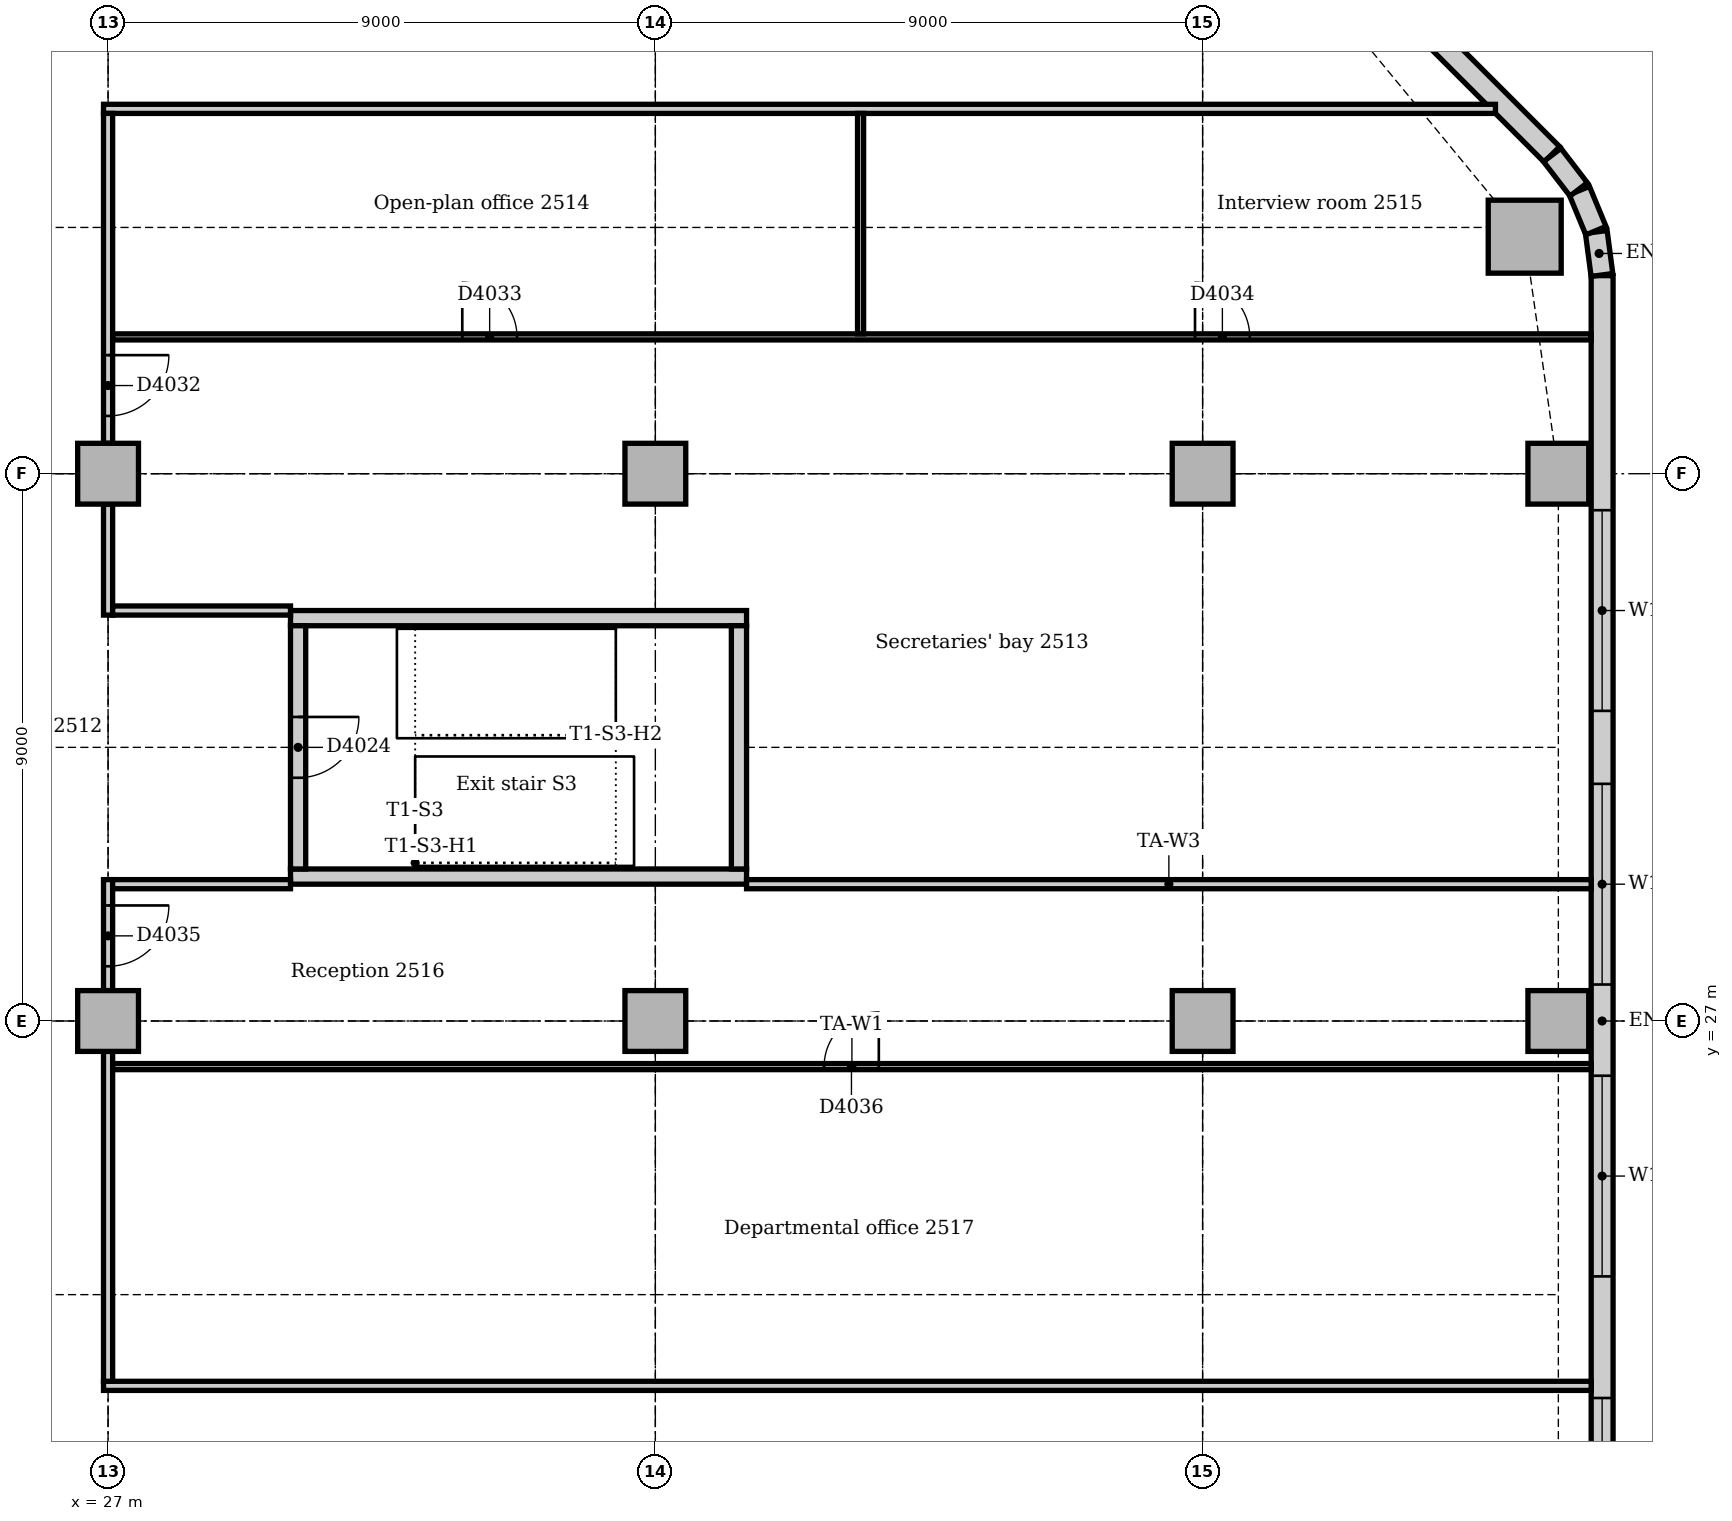
"""IFC4 building model, lengths in metres.
Left out: names, types, materials, properties, quantities, classifications, styles, units other than length and angle.
Written with IfcOpenShell. Run it as: python <this file> out.ifc"""

import sys

from ifc_helpers import new_model, si_unit, direction, frame, frame_2d, origin, origin_2d, place, context, subcontext, project, spatial, rectangle, extrude, element, fill, save


model = new_model("IFC4")
c1 = context("Model", 3, precision=1e-05, world=origin(), true_north=direction((0.0, 1.0)))
c2 = subcontext(c1, "Body", "Model", "MODEL_VIEW")
j1 = project(units=[si_unit("LENGTHUNIT", "METRE"), si_unit("PLANEANGLEUNIT", "RADIAN")], contexts=[c1])
p1 = place(None, origin())
s1 = spatial("IfcSite", under=j1, at=p1, CompositionType="ELEMENT")
p2 = place(p1, origin())
s2 = spatial("IfcBuilding", under=s1, at=p2, CompositionType="ELEMENT")
p3 = place(p2, frame((0.0, 0.0, 108.0)))
s3 = spatial("IfcBuildingStorey", under=s2, at=p3, CompositionType="ELEMENT", Elevation=108.0)
for number, where, z_axis, x_axis in (
    (1, (30.0, 29.375, 0.0), (0.0, 0.0, 1.0), (1.0, 0.0, 0.0)),
    (2, (37.5, 33.625, 0.0), (0.0, 0.0, 1.0), (-1.0, 0.0, 0.0)),
):
    element("IfcWall", number, at=place(p3, frame(where, z_axis=z_axis, x_axis=x_axis)), inside=s3, PredefinedType="SOLIDWALL", context=c2, shape_type="SweptSolid", body=[
        extrude(rectangle(XDim=7.5, YDim=0.25, at=frame_2d((3.75, 0.0))), origin(), (0.0, 0.0, 1.0), 4.0),
    ])
p4 = place(p3, frame((37.375, 29.5, 0.0), z_axis=(0.0, 0.0, 1.0), x_axis=(0.0, 1.0, 0.0)))
e3 = element("IfcWall", 3, at=p4, inside=s3, PredefinedType="SOLIDWALL", context=c2, shape_type="SweptSolid", body=[
    extrude(rectangle(XDim=4.0, YDim=0.25, at=frame_2d((2.0, 0.0))), origin(), (0.0, 0.0, 1.0), 4.0),
])
p5 = place(p3, frame((30.125, 33.5, 0.0), z_axis=(0.0, 0.0, 1.0), x_axis=(0.0, -1.0, 0.0)))
e4 = element("IfcWall", 4, at=p5, inside=s3, PredefinedType="SOLIDWALL", context=c2, shape_type="SweptSolid", body=[
    extrude(rectangle(XDim=4.0, YDim=0.25, at=frame_2d((2.0, 0.0))), origin(), (0.0, 0.0, 1.0), 4.0),
])
p6 = place(p5, frame((1.5, 0.0, 0.0)))
e5 = element("IfcOpeningElement", 5, at=p6, cuts=e4, PredefinedType="OPENING", context=c2, shape_type="SweptSolid", body=[
    extrude(rectangle(XDim=1.0, YDim=2.1, at=frame_2d((0.5, 1.05))), frame((0.0, 0.135, 0.0), z_axis=(0.0, -1.0, 0.0), x_axis=(1.0, 0.0, 0.0)), (0.0, 0.0, 1.0), 0.27),
])
p7 = place(p3, frame((50.297, 39.898, 0.0), z_axis=(0.0, 0.0, 1.0), x_axis=(1.0, 0.0, 0.0)))
e6 = element("IfcColumn", 6, at=p7, inside=s3, PredefinedType="COLUMN", context=c2, shape_type="SweptSolid", body=[
    extrude(rectangle(XDim=1.2, YDim=1.2, at=origin_2d()), origin(), (0.0, 0.0, 1.0), 3.85),
])
for number, where, z_axis, x_axis in (
    (7, (50.85, 27.0, 0.0), (0.0, 0.0, 1.0), (1.0, 0.0, 0.0)),
    (8, (50.85, 36.0, 0.0), (0.0, 0.0, 1.0), (1.0, 0.0, 0.0)),
    (9, (27.0, 27.0, 0.0), (0.0, 0.0, 1.0), (1.0, 0.0, 0.0)),
    (10, (27.0, 36.0, 0.0), (0.0, 0.0, 1.0), (1.0, 0.0, 0.0)),
    (11, (36.0, 27.0, 0.0), (0.0, 0.0, 1.0), (1.0, 0.0, 0.0)),
    (12, (36.0, 36.0, 0.0), (0.0, 0.0, 1.0), (1.0, 0.0, 0.0)),
    (13, (45.0, 27.0, 0.0), (0.0, 0.0, 1.0), (1.0, 0.0, 0.0)),
    (14, (45.0, 36.0, 0.0), (0.0, 0.0, 1.0), (1.0, 0.0, 0.0)),
):
    element("IfcColumn", number, at=place(p3, frame(where, z_axis=z_axis, x_axis=x_axis)), inside=s3, PredefinedType="COLUMN", context=c2, shape_type="SweptSolid", body=[
        extrude(rectangle(XDim=1.0, YDim=1.0, at=origin_2d()), origin(), (0.0, 0.0, 1.0), 3.85),
    ])
p8 = place(p3, frame((51.57, 14.743, 0.0), z_axis=(0.0, 0.0, 1.0), x_axis=(0.0, 1.0, 0.0)))
e15 = element("IfcWall", 15, at=p8, inside=s3, PredefinedType="STANDARD", context=c2, shape_type="SweptSolid", body=[
    extrude(rectangle(XDim=24.515, YDim=0.36, at=frame_2d((12.257, 0.0))), origin(), (0.0, 0.0, 1.0), 3.85),
])
p9 = place(p8, frame((4.257, 0.0, 0.9)))
e16 = element("IfcOpeningElement", 16, at=p9, cuts=e15, PredefinedType="OPENING", context=c2, shape_type="SweptSolid", body=[
    extrude(rectangle(XDim=1.8, YDim=1.6, at=frame_2d((0.9, 0.8))), frame((0.0, 0.19, 0.0), z_axis=(0.0, -1.0, 0.0), x_axis=(1.0, 0.0, 0.0)), (0.0, 0.0, 1.0), 0.38),
])
p10 = place(p8, frame((8.057, 0.0, 0.9)))
e17 = element("IfcOpeningElement", 17, at=p10, cuts=e15, PredefinedType="OPENING", context=c2, shape_type="SweptSolid", body=[
    extrude(rectangle(XDim=3.3, YDim=1.6, at=frame_2d((1.65, 0.8))), frame((0.0, 0.19, 0.0), z_axis=(0.0, -1.0, 0.0), x_axis=(1.0, 0.0, 0.0)), (0.0, 0.0, 1.0), 0.38),
])
p11 = place(p8, frame((12.857, 0.0, 0.9)))
e18 = element("IfcOpeningElement", 18, at=p11, cuts=e15, PredefinedType="OPENING", context=c2, shape_type="SweptSolid", body=[
    extrude(rectangle(XDim=3.3, YDim=1.6, at=frame_2d((1.65, 0.8))), frame((0.0, 0.19, 0.0), z_axis=(0.0, -1.0, 0.0), x_axis=(1.0, 0.0, 0.0)), (0.0, 0.0, 1.0), 0.38),
])
p12 = place(p8, frame((17.357, 0.0, 0.9)))
e19 = element("IfcOpeningElement", 19, at=p12, cuts=e15, PredefinedType="OPENING", context=c2, shape_type="SweptSolid", body=[
    extrude(rectangle(XDim=3.3, YDim=1.6, at=frame_2d((1.65, 0.8))), frame((0.0, 0.19, 0.0), z_axis=(0.0, -1.0, 0.0), x_axis=(1.0, 0.0, 0.0)), (0.0, 0.0, 1.0), 0.38),
])
p13 = place(p3, frame((50.744, 41.251, 0.0), z_axis=(0.0, 0.0, 1.0), x_axis=(-0.707106781187, 0.707106781187, 0.0)))
e20 = element("IfcWall", 20, at=p13, inside=s3, PredefinedType="STANDARD", context=c2, shape_type="SweptSolid", body=[
    extrude(rectangle(XDim=10.243, YDim=0.36, at=frame_2d((5.121, 0.0))), origin(), (0.0, 0.0, 1.0), 3.85),
])
p14 = place(p13, frame((3.471, 0.0, 0.9)))
e21 = element("IfcOpeningElement", 21, at=p14, cuts=e20, PredefinedType="OPENING", context=c2, shape_type="SweptSolid", body=[
    extrude(rectangle(XDim=3.3, YDim=1.6, at=frame_2d((1.65, 0.8))), frame((0.0, 0.19, 0.0), z_axis=(0.0, -1.0, 0.0), x_axis=(1.0, 0.0, 0.0)), (0.0, 0.0, 1.0), 0.38),
])
for number, where, z_axis, x_axis in (
    (22, (51.567, 39.269, 0.0), (0.0, 0.0, 1.0), (-0.131, 0.991, 0.0)),
    (23, (51.468, 39.997, 0.0), (0.0, 0.0, 1.0), (-0.383, 0.924, 0.0)),
):
    element("IfcWall", number, at=place(p3, frame(where, z_axis=z_axis, x_axis=x_axis)), inside=s3, PredefinedType="STANDARD", context=c2, shape_type="SweptSolid", body=[
        extrude(rectangle(XDim=0.713, YDim=0.36, at=frame_2d((0.356, 0.0))), origin(), (0.0, 0.0, 1.0), 3.85),
    ])
p15 = place(p3, frame((51.184, 40.675, 0.0), z_axis=(0.0, 0.0, 1.0), x_axis=(-0.608802368033, 0.793321924995, 0.0)))
e24 = element("IfcWall", 24, at=p15, inside=s3, PredefinedType="STANDARD", context=c2, shape_type="SweptSolid", body=[
    extrude(rectangle(XDim=0.713, YDim=0.36, at=frame_2d((0.357, 0.0))), origin(), (0.0, 0.0, 1.0), 3.85),
])
p16 = place(p3, frame((26.925, 21.0, 0.0), z_axis=(0.0, 0.0, 1.0), x_axis=(1.0, 0.0, 0.0)))
e25 = element("IfcWall", 25, at=p16, inside=s3, PredefinedType="PARTITIONING", context=c2, shape_type="SweptSolid", body=[
    extrude(rectangle(XDim=24.465, YDim=0.15, at=frame_2d((12.232, 0.0))), origin(), (0.0, 0.0, 1.0), 3.85),
])
p17 = place(p3, frame((26.925, 42.0, 0.0), z_axis=(0.0, 0.0, 1.0), x_axis=(1.0, 0.0, 0.0)))
e26 = element("IfcWall", 26, at=p17, inside=s3, PredefinedType="PARTITIONING", context=c2, shape_type="SweptSolid", body=[
    extrude(rectangle(XDim=22.891, YDim=0.15, at=frame_2d((11.445, 0.0))), origin(), (0.0, 0.0, 1.0), 3.85),
])
p18 = place(p3, frame((27.0, 21.075, 0.0), z_axis=(0.0, 0.0, 1.0), x_axis=(0.0, 1.0, 0.0)))
e27 = element("IfcWall", 27, at=p18, inside=s3, PredefinedType="PARTITIONING", context=c2, shape_type="SweptSolid", body=[
    extrude(rectangle(XDim=5.425, YDim=0.15, at=frame_2d((2.712, 0.0))), origin(), (0.0, 0.0, 1.0), 3.256),
])
p19 = place(p3, frame((27.0, 27.5, 0.0), z_axis=(0.0, 0.0, 1.0), x_axis=(0.0, 1.0, 0.0)))
e28 = element("IfcWall", 28, at=p19, inside=s3, PredefinedType="PARTITIONING", context=c2, shape_type="SweptSolid", body=[
    extrude(rectangle(XDim=1.825, YDim=0.15, at=frame_2d((0.912, 0.0))), origin(), (0.0, 0.0, 1.0), 3.256),
])
p20 = place(p19, frame((0.4, 0.0, 0.0)))
e29 = element("IfcOpeningElement", 29, at=p20, cuts=e28, PredefinedType="OPENING", context=c2, shape_type="SweptSolid", body=[
    extrude(rectangle(XDim=1.0, YDim=2.1, at=frame_2d((0.5, 1.05))), frame((0.0, 0.085, 0.0), z_axis=(0.0, -1.0, 0.0), x_axis=(1.0, 0.0, 0.0)), (0.0, 0.0, 1.0), 0.17),
])
p21 = place(p3, frame((27.0, 33.675, 0.0), z_axis=(0.0, 0.0, 1.0), x_axis=(0.0, 1.0, 0.0)))
e30 = element("IfcWall", 30, at=p21, inside=s3, PredefinedType="PARTITIONING", context=c2, shape_type="SweptSolid", body=[
    extrude(rectangle(XDim=1.825, YDim=0.15, at=frame_2d((0.912, 0.0))), origin(), (0.0, 0.0, 1.0), 3.256),
])
p22 = place(p3, frame((27.0, 36.5, 0.0), z_axis=(0.0, 0.0, 1.0), x_axis=(0.0, 1.0, 0.0)))
e31 = element("IfcWall", 31, at=p22, inside=s3, PredefinedType="PARTITIONING", context=c2, shape_type="SweptSolid", body=[
    extrude(rectangle(XDim=5.425, YDim=0.15, at=frame_2d((2.712, 0.0))), origin(), (0.0, 0.0, 1.0), 3.256),
])
p23 = place(p22, frame((0.45, 0.0, 0.0)))
e32 = element("IfcOpeningElement", 32, at=p23, cuts=e31, PredefinedType="OPENING", context=c2, shape_type="SweptSolid", body=[
    extrude(rectangle(XDim=1.0, YDim=2.1, at=frame_2d((0.5, 1.05))), frame((0.0, 0.085, 0.0), z_axis=(0.0, -1.0, 0.0), x_axis=(1.0, 0.0, 0.0)), (0.0, 0.0, 1.0), 0.17),
])
for number, where, z_axis, x_axis in (
    (33, (27.075, 29.25, 0.0), (0.0, 0.0, 1.0), (1.0, 0.0, 0.0)),
    (34, (27.075, 33.75, 0.0), (0.0, 0.0, 1.0), (1.0, 0.0, 0.0)),
):
    element("IfcWall", number, at=place(p3, frame(where, z_axis=z_axis, x_axis=x_axis)), inside=s3, PredefinedType="PARTITIONING", context=c2, shape_type="SweptSolid", body=[
        extrude(rectangle(XDim=2.925, YDim=0.15, at=frame_2d((1.462, 0.0))), origin(), (0.0, 0.0, 1.0), 3.85),
    ])
p24 = place(p3, frame((37.5, 29.25, 0.0), z_axis=(0.0, 0.0, 1.0), x_axis=(1.0, 0.0, 0.0)))
e35 = element("IfcWall", 35, at=p24, inside=s3, PredefinedType="PARTITIONING", context=c2, shape_type="SweptSolid", body=[
    extrude(rectangle(XDim=13.89, YDim=0.15, at=frame_2d((6.945, 0.0))), origin(), (0.0, 0.0, 1.0), 3.85),
])
p25 = place(p3, frame((27.075, 26.25, 0.0), z_axis=(0.0, 0.0, 1.0), x_axis=(1.0, 0.0, 0.0)))
e36 = element("IfcWall", 36, at=p25, inside=s3, PredefinedType="PARTITIONING", context=c2, shape_type="SweptSolid", body=[
    extrude(rectangle(XDim=24.315, YDim=0.1, at=frame_2d((12.158, 0.0))), origin(), (0.0, 0.0, 1.0), 3.85),
])
p26 = place(p25, frame((11.7, 0.0, 0.0)))
e37 = element("IfcOpeningElement", 37, at=p26, cuts=e36, PredefinedType="OPENING", context=c2, shape_type="SweptSolid", body=[
    extrude(rectangle(XDim=0.9, YDim=2.1, at=frame_2d((0.45, 1.05))), frame((0.0, 0.06, 0.0), z_axis=(0.0, -1.0, 0.0), x_axis=(1.0, 0.0, 0.0)), (0.0, 0.0, 1.0), 0.12),
])
p27 = place(p3, frame((27.075, 38.25, 0.0), z_axis=(0.0, 0.0, 1.0), x_axis=(1.0, 0.0, 0.0)))
e38 = element("IfcWall", 38, at=p27, inside=s3, PredefinedType="PARTITIONING", context=c2, shape_type="SweptSolid", body=[
    extrude(rectangle(XDim=24.315, YDim=0.1, at=frame_2d((12.158, 0.0))), origin(), (0.0, 0.0, 1.0), 3.85),
])
p28 = place(p27, frame((5.75, 0.0, 0.0)))
e39 = element("IfcOpeningElement", 39, at=p28, cuts=e38, PredefinedType="OPENING", context=c2, shape_type="SweptSolid", body=[
    extrude(rectangle(XDim=0.9, YDim=2.1, at=frame_2d((0.45, 1.05))), frame((0.0, 0.06, 0.0), z_axis=(0.0, -1.0, 0.0), x_axis=(1.0, 0.0, 0.0)), (0.0, 0.0, 1.0), 0.12),
])
p29 = place(p27, frame((17.8, 0.0, 0.0)))
e40 = element("IfcOpeningElement", 40, at=p29, cuts=e38, PredefinedType="OPENING", context=c2, shape_type="SweptSolid", body=[
    extrude(rectangle(XDim=0.9, YDim=2.1, at=frame_2d((0.45, 1.05))), frame((0.0, 0.06, 0.0), z_axis=(0.0, -1.0, 0.0), x_axis=(1.0, 0.0, 0.0)), (0.0, 0.0, 1.0), 0.12),
])
p30 = place(p3, frame((39.375, 38.3, 0.0), z_axis=(0.0, 0.0, 1.0), x_axis=(0.0, 1.0, 0.0)))
e41 = element("IfcWall", 41, at=p30, inside=s3, PredefinedType="PARTITIONING", context=c2, shape_type="SweptSolid", body=[
    extrude(rectangle(XDim=3.625, YDim=0.1, at=frame_2d((1.812, 0.0))), origin(), (0.0, 0.0, 1.0), 3.85),
])
p31 = place(p9, origin())
e42 = element("IfcWindow", 42, at=p31, inside=s3, PartitioningType="SINGLE_PANEL", PredefinedType="WINDOW", context=c2, shape_type="SweptSolid", body=[
    extrude(rectangle(XDim=1.8, YDim=1.6, at=frame_2d((0.9, 0.8))), frame((0.0, 0.13, 0.0), z_axis=(0.0, -1.0, 0.0), x_axis=(1.0, 0.0, 0.0)), (0.0, 0.0, 1.0), 0.06),
])
fill(e16, e42)
p32 = place(p10, origin())
e43 = element("IfcWindow", 43, at=p32, inside=s3, PartitioningType="SINGLE_PANEL", PredefinedType="WINDOW", context=c2, shape_type="SweptSolid", body=[
    extrude(rectangle(XDim=3.3, YDim=1.6, at=frame_2d((1.65, 0.8))), frame((0.0, 0.13, 0.0), z_axis=(0.0, -1.0, 0.0), x_axis=(1.0, 0.0, 0.0)), (0.0, 0.0, 1.0), 0.06),
])
fill(e17, e43)
p33 = place(p11, origin())
e44 = element("IfcWindow", 44, at=p33, inside=s3, PartitioningType="SINGLE_PANEL", PredefinedType="WINDOW", context=c2, shape_type="SweptSolid", body=[
    extrude(rectangle(XDim=3.3, YDim=1.6, at=frame_2d((1.65, 0.8))), frame((0.0, 0.13, 0.0), z_axis=(0.0, -1.0, 0.0), x_axis=(1.0, 0.0, 0.0)), (0.0, 0.0, 1.0), 0.06),
])
fill(e18, e44)
p34 = place(p12, origin())
e45 = element("IfcWindow", 45, at=p34, inside=s3, PartitioningType="SINGLE_PANEL", PredefinedType="WINDOW", context=c2, shape_type="SweptSolid", body=[
    extrude(rectangle(XDim=3.3, YDim=1.6, at=frame_2d((1.65, 0.8))), frame((0.0, 0.13, 0.0), z_axis=(0.0, -1.0, 0.0), x_axis=(1.0, 0.0, 0.0)), (0.0, 0.0, 1.0), 0.06),
])
fill(e19, e45)
p35 = place(p6, origin())
e46 = element("IfcDoor", 46, at=p35, inside=s3, OperationType="SINGLE_SWING_LEFT", PredefinedType="DOOR", context=c2, shape_type="SweptSolid", body=[
    extrude(rectangle(XDim=1.0, YDim=2.1, at=frame_2d((0.5, 1.05))), frame((0.0, 0.025, 0.0), z_axis=(0.0, -1.0, 0.0), x_axis=(1.0, 0.0, 0.0)), (0.0, 0.0, 1.0), 0.05),
])
fill(e5, e46)
p36 = place(p23, frame((1.0, 0.0, 0.0), z_axis=(0.0, 0.0, 1.0), x_axis=(-1.0, 0.0, 0.0)))
e47 = element("IfcDoor", 47, at=p36, inside=s3, OperationType="SINGLE_SWING_LEFT", PredefinedType="DOOR", context=c2, shape_type="SweptSolid", body=[
    extrude(rectangle(XDim=1.0, YDim=2.1, at=frame_2d((0.5, 1.05))), frame((0.0, 0.025, 0.0), z_axis=(0.0, -1.0, 0.0), x_axis=(1.0, 0.0, 0.0)), (0.0, 0.0, 1.0), 0.05),
])
fill(e32, e47)
p37 = place(p28, origin())
e48 = element("IfcDoor", 48, at=p37, inside=s3, OperationType="SINGLE_SWING_LEFT", PredefinedType="DOOR", context=c2, shape_type="SweptSolid", body=[
    extrude(rectangle(XDim=0.9, YDim=2.1, at=frame_2d((0.45, 1.05))), frame((0.0, 0.025, 0.0), z_axis=(0.0, -1.0, 0.0), x_axis=(1.0, 0.0, 0.0)), (0.0, 0.0, 1.0), 0.05),
])
fill(e39, e48)
p38 = place(p29, origin())
e49 = element("IfcDoor", 49, at=p38, inside=s3, OperationType="SINGLE_SWING_LEFT", PredefinedType="DOOR", context=c2, shape_type="SweptSolid", body=[
    extrude(rectangle(XDim=0.9, YDim=2.1, at=frame_2d((0.45, 1.05))), frame((0.0, 0.025, 0.0), z_axis=(0.0, -1.0, 0.0), x_axis=(1.0, 0.0, 0.0)), (0.0, 0.0, 1.0), 0.05),
])
fill(e40, e49)
p39 = place(p20, frame((1.0, 0.0, 0.0), z_axis=(0.0, 0.0, 1.0), x_axis=(-1.0, 0.0, 0.0)))
e50 = element("IfcDoor", 50, at=p39, inside=s3, OperationType="SINGLE_SWING_LEFT", PredefinedType="DOOR", context=c2, shape_type="SweptSolid", body=[
    extrude(rectangle(XDim=1.0, YDim=2.1, at=frame_2d((0.5, 1.05))), frame((0.0, 0.025, 0.0), z_axis=(0.0, -1.0, 0.0), x_axis=(1.0, 0.0, 0.0)), (0.0, 0.0, 1.0), 0.05),
])
fill(e29, e50)
p40 = place(p26, origin())
e51 = element("IfcDoor", 51, at=p40, inside=s3, OperationType="SINGLE_SWING_RIGHT", PredefinedType="DOOR", context=c2, shape_type="SweptSolid", body=[
    extrude(rectangle(XDim=0.9, YDim=2.1, at=frame_2d((0.45, 1.05))), frame((0.0, 0.025, 0.0), z_axis=(0.0, -1.0, 0.0), x_axis=(1.0, 0.0, 0.0)), (0.0, 0.0, 1.0), 0.05),
])
fill(e37, e51)
save(model, sys.argv[1])
